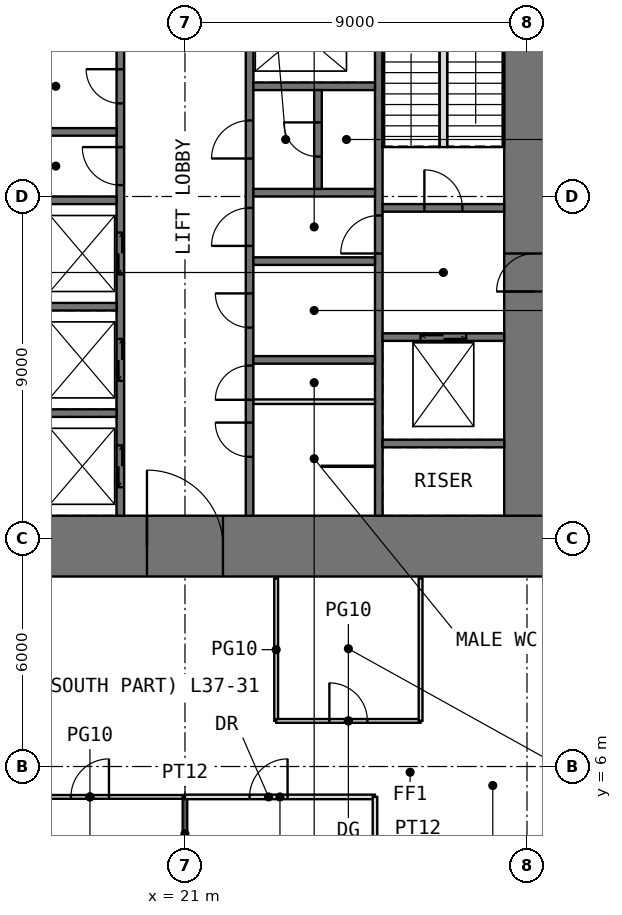
"""IFC4 building model, lengths in metres.
Left out: names, types, materials, properties, quantities, classifications, styles, units other than length and angle.
Written with IfcOpenShell. Run it as: python <this file> out.ifc"""

import sys

from ifc_helpers import new_model, si_unit, direction, frame, frame_2d, origin, place, context, subcontext, project, spatial, rectangle, extrude, element, fill, save


model = new_model("IFC4")
c1 = context("Model", 3, precision=1e-05, world=origin(), true_north=direction((0.0, 1.0)))
c2 = subcontext(c1, "Body", "Model", "MODEL_VIEW")
j1 = project(units=[si_unit("LENGTHUNIT", "METRE"), si_unit("PLANEANGLEUNIT", "RADIAN")], contexts=[c1])
p1 = place(None, origin())
s1 = spatial("IfcSite", under=j1, at=p1, CompositionType="ELEMENT")
p2 = place(p1, origin())
s2 = spatial("IfcBuilding", under=s1, at=p2, CompositionType="ELEMENT")
p3 = place(p2, frame((0.0, 0.0, 156.5)))
s3 = spatial("IfcBuildingStorey", under=s2, at=p3, CompositionType="ELEMENT", Elevation=156.5)
p4 = place(p3, frame((11.0, 11.8, -0.05), z_axis=(0.0, 0.0, 1.0), x_axis=(1.0, 0.0, 0.0)))
e1 = element("IfcWall", 1, at=p4, inside=s3, PredefinedType="SHEAR", context=c2, shape_type="SweptSolid", body=[
    extrude(rectangle(XDim=20.0, YDim=1.6, at=frame_2d((10.0, 0.0))), origin(), (0.0, 0.0, 1.0), 3.8),
])
p5 = place(p4, frame((9.0, 0.0, 0.05)))
e2 = element("IfcOpeningElement", 2, at=p5, cuts=e1, PredefinedType="OPENING", context=c2, shape_type="SweptSolid", body=[
    extrude(rectangle(XDim=2.0, YDim=2.2, at=frame_2d((1.0, 1.1))), frame((0.0, 0.81, 0.0), z_axis=(0.0, -1.0, 0.0), x_axis=(1.0, 0.0, 0.0)), (0.0, 0.0, 1.0), 1.62),
])
p6 = place(p3, frame((30.2, 12.6, -0.05), z_axis=(0.0, 0.0, 1.0), x_axis=(0.0, 1.0, 0.0)))
e3 = element("IfcWall", 3, at=p6, inside=s3, PredefinedType="SHEAR", context=c2, shape_type="SweptSolid", body=[
    extrude(rectangle(XDim=16.8, YDim=1.6, at=frame_2d((8.4, 0.0))), origin(), (0.0, 0.0, 1.0), 3.8),
])
p7 = place(p6, frame((5.9, 0.0, 0.05)))
e4 = element("IfcOpeningElement", 4, at=p7, cuts=e3, PredefinedType="OPENING", context=c2, shape_type="SweptSolid", body=[
    extrude(rectangle(XDim=1.0, YDim=2.2, at=frame_2d((0.5, 1.1))), frame((0.0, 0.81, 0.0), z_axis=(0.0, -1.0, 0.0), x_axis=(1.0, 0.0, 0.0)), (0.0, 0.0, 1.0), 1.62),
])
p8 = place(p3, frame((19.3, 12.6, -0.05), z_axis=(0.0, 0.0, 1.0), x_axis=(0.0, 1.0, 0.0)))
e5 = element("IfcWall", 5, at=p8, inside=s3, PredefinedType="SHEAR", context=c2, shape_type="SweptSolid", body=[
    extrude(rectangle(XDim=16.8, YDim=0.2, at=frame_2d((8.4, 0.0))), origin(), (0.0, 0.0, 1.0), 3.8),
])
p9 = place(p8, frame((8.7, 0.0, 0.05)))
e6 = element("IfcOpeningElement", 6, at=p9, cuts=e5, PredefinedType="OPENING", context=c2, shape_type="SweptSolid", body=[
    extrude(rectangle(XDim=1.0, YDim=2.2, at=frame_2d((0.5, 1.1))), frame((0.0, 0.11, 0.0), z_axis=(0.0, -1.0, 0.0), x_axis=(1.0, 0.0, 0.0)), (0.0, 0.0, 1.0), 0.22),
])
p10 = place(p8, frame((10.85, 0.0, 0.05)))
e7 = element("IfcOpeningElement", 7, at=p10, cuts=e5, PredefinedType="OPENING", context=c2, shape_type="SweptSolid", body=[
    extrude(rectangle(XDim=0.9, YDim=2.2, at=frame_2d((0.45, 1.1))), frame((0.0, 0.11, 0.0), z_axis=(0.0, -1.0, 0.0), x_axis=(1.0, 0.0, 0.0)), (0.0, 0.0, 1.0), 0.22),
])
p11 = place(p8, frame((13.3, 0.0, 0.05)))
e8 = element("IfcOpeningElement", 8, at=p11, cuts=e5, PredefinedType="OPENING", context=c2, shape_type="SweptSolid", body=[
    extrude(rectangle(XDim=1.0, YDim=2.2, at=frame_2d((0.5, 1.1))), frame((0.0, 0.11, 0.0), z_axis=(0.0, -1.0, 0.0), x_axis=(1.0, 0.0, 0.0)), (0.0, 0.0, 1.0), 0.22),
])
p12 = place(p8, frame((15.55, 0.0, 0.05)))
e9 = element("IfcOpeningElement", 9, at=p12, cuts=e5, PredefinedType="OPENING", context=c2, shape_type="SweptSolid", body=[
    extrude(rectangle(XDim=0.9, YDim=2.2, at=frame_2d((0.45, 1.1))), frame((0.0, 0.11, 0.0), z_axis=(0.0, -1.0, 0.0), x_axis=(1.0, 0.0, 0.0)), (0.0, 0.0, 1.0), 0.22),
])
p13 = place(p8, frame((0.75, 0.0, 0.05)))
e10 = element("IfcOpeningElement", 10, at=p13, cuts=e5, PredefinedType="OPENING", context=c2, shape_type="SweptSolid", body=[
    extrude(rectangle(XDim=1.1, YDim=2.2, at=frame_2d((0.55, 1.1))), frame((0.0, 0.11, 0.0), z_axis=(0.0, -1.0, 0.0), x_axis=(1.0, 0.0, 0.0)), (0.0, 0.0, 1.0), 0.22),
])
p14 = place(p8, frame((3.55, 0.0, 0.05)))
e11 = element("IfcOpeningElement", 11, at=p14, cuts=e5, PredefinedType="OPENING", context=c2, shape_type="SweptSolid", body=[
    extrude(rectangle(XDim=1.1, YDim=2.2, at=frame_2d((0.55, 1.1))), frame((0.0, 0.11, 0.0), z_axis=(0.0, -1.0, 0.0), x_axis=(1.0, 0.0, 0.0)), (0.0, 0.0, 1.0), 0.22),
])
p15 = place(p8, frame((6.35, 0.0, 0.05)))
e12 = element("IfcOpeningElement", 12, at=p15, cuts=e5, PredefinedType="OPENING", context=c2, shape_type="SweptSolid", body=[
    extrude(rectangle(XDim=1.1, YDim=2.2, at=frame_2d((0.55, 1.1))), frame((0.0, 0.11, 0.0), z_axis=(0.0, -1.0, 0.0), x_axis=(1.0, 0.0, 0.0)), (0.0, 0.0, 1.0), 0.22),
])
p16 = place(p3, frame((22.7, 12.6, -0.05), z_axis=(0.0, 0.0, 1.0), x_axis=(0.0, 1.0, 0.0)))
e13 = element("IfcWall", 13, at=p16, inside=s3, PredefinedType="SHEAR", context=c2, shape_type="SweptSolid", body=[
    extrude(rectangle(XDim=16.8, YDim=0.2, at=frame_2d((8.4, 0.0))), origin(), (0.0, 0.0, 1.0), 3.8),
])
p17 = place(p16, frame((3.05, 0.0, 0.05)))
e14 = element("IfcOpeningElement", 14, at=p17, cuts=e13, PredefinedType="OPENING", context=c2, shape_type="SweptSolid", body=[
    extrude(rectangle(XDim=0.9, YDim=2.2, at=frame_2d((0.45, 1.1))), frame((0.0, 0.11, 0.0), z_axis=(0.0, -1.0, 0.0), x_axis=(1.0, 0.0, 0.0)), (0.0, 0.0, 1.0), 0.22),
])
p18 = place(p16, frame((7.1, 0.0, 0.05)))
e15 = element("IfcOpeningElement", 15, at=p18, cuts=e13, PredefinedType="OPENING", context=c2, shape_type="SweptSolid", body=[
    extrude(rectangle(XDim=1.0, YDim=2.2, at=frame_2d((0.5, 1.1))), frame((0.0, 0.11, 0.0), z_axis=(0.0, -1.0, 0.0), x_axis=(1.0, 0.0, 0.0)), (0.0, 0.0, 1.0), 0.22),
])
p19 = place(p16, frame((1.55, 0.0, 0.05)))
e16 = element("IfcOpeningElement", 16, at=p19, cuts=e13, PredefinedType="OPENING", context=c2, shape_type="SweptSolid", body=[
    extrude(rectangle(XDim=0.9, YDim=2.2, at=frame_2d((0.45, 1.1))), frame((0.0, 0.11, 0.0), z_axis=(0.0, -1.0, 0.0), x_axis=(1.0, 0.0, 0.0)), (0.0, 0.0, 1.0), 0.22),
])
p20 = place(p16, frame((4.95, 0.0, 0.05)))
e17 = element("IfcOpeningElement", 17, at=p20, cuts=e13, PredefinedType="OPENING", context=c2, shape_type="SweptSolid", body=[
    extrude(rectangle(XDim=0.9, YDim=2.2, at=frame_2d((0.45, 1.1))), frame((0.0, 0.11, 0.0), z_axis=(0.0, -1.0, 0.0), x_axis=(1.0, 0.0, 0.0)), (0.0, 0.0, 1.0), 0.22),
])
p21 = place(p16, frame((9.4, 0.0, 0.05)))
e18 = element("IfcOpeningElement", 18, at=p21, cuts=e13, PredefinedType="OPENING", context=c2, shape_type="SweptSolid", body=[
    extrude(rectangle(XDim=1.0, YDim=2.2, at=frame_2d((0.5, 1.1))), frame((0.0, 0.11, 0.0), z_axis=(0.0, -1.0, 0.0), x_axis=(1.0, 0.0, 0.0)), (0.0, 0.0, 1.0), 0.22),
])
p22 = place(p3, frame((26.1, 12.6, -0.05), z_axis=(0.0, 0.0, 1.0), x_axis=(0.0, 1.0, 0.0)))
e19 = element("IfcWall", 19, at=p22, inside=s3, PredefinedType="SHEAR", context=c2, shape_type="SweptSolid", body=[
    extrude(rectangle(XDim=16.8, YDim=0.2, at=frame_2d((8.4, 0.0))), origin(), (0.0, 0.0, 1.0), 3.8),
])
p23 = place(p22, frame((6.9, 0.0, 0.05)))
e20 = element("IfcOpeningElement", 20, at=p23, cuts=e19, PredefinedType="OPENING", context=c2, shape_type="SweptSolid", body=[
    extrude(rectangle(XDim=1.0, YDim=2.2, at=frame_2d((0.5, 1.1))), frame((0.0, 0.11, 0.0), z_axis=(0.0, -1.0, 0.0), x_axis=(1.0, 0.0, 0.0)), (0.0, 0.0, 1.0), 0.22),
])
for number, where, z_axis, x_axis in (
    (21, (16.0, 15.3, -0.05), (0.0, 0.0, 1.0), (1.0, 0.0, 0.0)),
    (22, (16.0, 18.1, -0.05), (0.0, 0.0, 1.0), (1.0, 0.0, 0.0)),
    (23, (16.0, 20.9, -0.05), (0.0, 0.0, 1.0), (1.0, 0.0, 0.0)),
    (24, (16.0, 22.7, -0.05), (0.0, 0.0, 1.0), (1.0, 0.0, 0.0)),
    (25, (22.8, 16.7, -0.05), (0.0, 0.0, 1.0), (1.0, 0.0, 0.0)),
    (26, (22.8, 19.3, -0.05), (0.0, 0.0, 1.0), (1.0, 0.0, 0.0)),
    (27, (22.8, 21.1, -0.05), (0.0, 0.0, 1.0), (1.0, 0.0, 0.0)),
    (28, (22.8, 23.9, -0.05), (0.0, 0.0, 1.0), (1.0, 0.0, 0.0)),
    (29, (26.2, 14.5, -0.05), (0.0, 0.0, 1.0), (1.0, 0.0, 0.0)),
):
    element("IfcWall", number, at=place(p3, frame(where, z_axis=z_axis, x_axis=x_axis)), inside=s3, PredefinedType="SHEAR", context=c2, shape_type="SweptSolid", body=[
        extrude(rectangle(XDim=3.2, YDim=0.2, at=frame_2d((1.6, 0.0))), origin(), (0.0, 0.0, 1.0), 3.8),
    ])
p24 = place(p3, frame((26.2, 17.3, -0.05), z_axis=(0.0, 0.0, 1.0), x_axis=(1.0, 0.0, 0.0)))
e30 = element("IfcWall", 30, at=p24, inside=s3, PredefinedType="SHEAR", context=c2, shape_type="SweptSolid", body=[
    extrude(rectangle(XDim=3.2, YDim=0.2, at=frame_2d((1.6, 0.0))), origin(), (0.0, 0.0, 1.0), 3.8),
])
p25 = place(p24, frame((1.0, 0.0, 0.05)))
e31 = element("IfcOpeningElement", 31, at=p25, cuts=e30, PredefinedType="OPENING", context=c2, shape_type="SweptSolid", body=[
    extrude(rectangle(XDim=1.2, YDim=2.2, at=frame_2d((0.6, 1.1))), frame((0.0, 0.11, 0.0), z_axis=(0.0, -1.0, 0.0), x_axis=(1.0, 0.0, 0.0)), (0.0, 0.0, 1.0), 0.22),
])
p26 = place(p3, frame((26.2, 20.7, -0.05), z_axis=(0.0, 0.0, 1.0), x_axis=(1.0, 0.0, 0.0)))
e32 = element("IfcWall", 32, at=p26, inside=s3, PredefinedType="SHEAR", context=c2, shape_type="SweptSolid", body=[
    extrude(rectangle(XDim=3.2, YDim=0.2, at=frame_2d((1.6, 0.0))), origin(), (0.0, 0.0, 1.0), 3.8),
])
p27 = place(p26, frame((1.1, 0.0, 0.05)))
e33 = element("IfcOpeningElement", 33, at=p27, cuts=e32, PredefinedType="OPENING", context=c2, shape_type="SweptSolid", body=[
    extrude(rectangle(XDim=1.0, YDim=2.2, at=frame_2d((0.5, 1.1))), frame((0.0, 0.11, 0.0), z_axis=(0.0, -1.0, 0.0), x_axis=(1.0, 0.0, 0.0)), (0.0, 0.0, 1.0), 0.22),
])
p28 = place(p3, frame((22.8, 15.6, 0.0), z_axis=(0.0, 0.0, 1.0), x_axis=(1.0, 0.0, 0.0)))
e34 = element("IfcWall", 34, at=p28, inside=s3, PredefinedType="PARTITIONING", context=c2, shape_type="SweptSolid", body=[
    extrude(rectangle(XDim=3.2, YDim=0.12, at=frame_2d((1.6, 0.0))), origin(), (0.0, 0.0, 1.0), 3.55),
])
p29 = place(p3, frame((24.6, 13.9, 0.0), z_axis=(0.0, 0.0, 1.0), x_axis=(1.0, 0.0, 0.0)))
e35 = element("IfcWall", 35, at=p29, inside=s3, PredefinedType="PARTITIONING", context=c2, shape_type="SweptSolid", body=[
    extrude(rectangle(XDim=1.4, YDim=0.03, at=frame_2d((0.7, 0.0))), origin(), (0.0, 0.0, 1.0), 3.55),
])
p30 = place(p3, frame((24.5, 21.2, -0.05), z_axis=(0.0, 0.0, 1.0), x_axis=(0.0, 1.0, 0.0)))
e36 = element("IfcWall", 36, at=p30, inside=s3, PredefinedType="SHEAR", context=c2, shape_type="SweptSolid", body=[
    extrude(rectangle(XDim=2.6, YDim=0.2, at=frame_2d((1.3, 0.0))), origin(), (0.0, 0.0, 1.0), 3.8),
])
p31 = place(p30, frame((0.85, 0.0, 0.05)))
e37 = element("IfcOpeningElement", 37, at=p31, cuts=e36, PredefinedType="OPENING", context=c2, shape_type="SweptSolid", body=[
    extrude(rectangle(XDim=0.9, YDim=2.2, at=frame_2d((0.45, 1.1))), frame((0.0, 0.11, 0.0), z_axis=(0.0, -1.0, 0.0), x_axis=(1.0, 0.0, 0.0)), (0.0, 0.0, 1.0), 0.22),
])
p32 = place(p3, frame((16.0, 5.2, 0.0), z_axis=(0.0, 0.0, 1.0), x_axis=(1.0, 0.0, 0.0)))
e38 = element("IfcWall", 38, at=p32, inside=s3, PredefinedType="PARTITIONING", context=c2, shape_type="SweptSolid", body=[
    extrude(rectangle(XDim=5.0, YDim=0.1, at=frame_2d((2.5, 0.0))), origin(), (0.0, 0.0, 1.0), 3.55),
])
p33 = place(p32, frame((2.0, 0.0, 0.0)))
e39 = element("IfcOpeningElement", 39, at=p33, cuts=e38, PredefinedType="OPENING", context=c2, shape_type="SweptSolid", body=[
    extrude(rectangle(XDim=1.0, YDim=2.4, at=frame_2d((0.5, 1.2))), frame((0.0, 0.06, 0.0), z_axis=(0.0, -1.0, 0.0), x_axis=(1.0, 0.0, 0.0)), (0.0, 0.0, 1.0), 0.12),
])
p34 = place(p3, frame((21.0, 3.26, 0.0), z_axis=(0.0, 0.0, 1.0), x_axis=(0.0, 1.0, 0.0)))
e40 = element("IfcWall", 40, at=p34, inside=s3, PredefinedType="PARTITIONING", context=c2, shape_type="SweptSolid", body=[
    extrude(rectangle(XDim=1.94, YDim=0.12, at=frame_2d((0.97, 0.0))), origin(), (0.0, 0.0, 1.0), 3.55),
])
p35 = place(p3, frame((21.0, 5.2, 0.0), z_axis=(0.0, 0.0, 1.0), x_axis=(1.0, 0.0, 0.0)))
e41 = element("IfcWall", 41, at=p35, inside=s3, PredefinedType="PARTITIONING", context=c2, shape_type="SweptSolid", body=[
    extrude(rectangle(XDim=5.0, YDim=0.12, at=frame_2d((2.5, 0.0))), origin(), (0.0, 0.0, 1.0), 3.55),
])
p36 = place(p35, frame((1.7, 0.0, 0.0)))
e42 = element("IfcOpeningElement", 42, at=p36, cuts=e41, PredefinedType="OPENING", context=c2, shape_type="SweptSolid", body=[
    extrude(rectangle(XDim=1.0, YDim=2.2, at=frame_2d((0.5, 1.1))), frame((0.0, 0.07, 0.0), z_axis=(0.0, -1.0, 0.0), x_axis=(1.0, 0.0, 0.0)), (0.0, 0.0, 1.0), 0.14),
])
p37 = place(p3, frame((23.4, 7.2, 0.0), z_axis=(0.0, 0.0, 1.0), x_axis=(0.0, 1.0, 0.0)))
e43 = element("IfcWall", 43, at=p37, inside=s3, PredefinedType="PARTITIONING", context=c2, shape_type="SweptSolid", body=[
    extrude(rectangle(XDim=3.75, YDim=0.1, at=frame_2d((1.875, 0.0))), origin(), (0.0, 0.0, 1.0), 3.55),
])
p38 = place(p3, frame((23.4, 7.2, 0.0), z_axis=(0.0, 0.0, 1.0), x_axis=(1.0, 0.0, 0.0)))
e44 = element("IfcWall", 44, at=p38, inside=s3, PredefinedType="PARTITIONING", context=c2, shape_type="SweptSolid", body=[
    extrude(rectangle(XDim=3.8, YDim=0.1, at=frame_2d((1.9, 0.0))), origin(), (0.0, 0.0, 1.0), 3.55),
])
p39 = place(p38, frame((1.4, 0.0, 0.0)))
e45 = element("IfcOpeningElement", 45, at=p39, cuts=e44, PredefinedType="OPENING", context=c2, shape_type="SweptSolid", body=[
    extrude(rectangle(XDim=1.0, YDim=2.4, at=frame_2d((0.5, 1.2))), frame((0.0, 0.06, 0.0), z_axis=(0.0, -1.0, 0.0), x_axis=(1.0, 0.0, 0.0)), (0.0, 0.0, 1.0), 0.12),
])
p40 = place(p3, frame((26.0, 1.26, 0.0), z_axis=(0.0, 0.0, 1.0), x_axis=(0.0, 1.0, 0.0)))
e46 = element("IfcWall", 46, at=p40, inside=s3, PredefinedType="PARTITIONING", context=c2, shape_type="SweptSolid", body=[
    extrude(rectangle(XDim=3.94, YDim=0.12, at=frame_2d((1.97, 0.0))), origin(), (0.0, 0.0, 1.0), 2.736),
])
p41 = place(p3, frame((27.2, 7.2, 0.0), z_axis=(0.0, 0.0, 1.0), x_axis=(0.0, 1.0, 0.0)))
e47 = element("IfcWall", 47, at=p41, inside=s3, PredefinedType="PARTITIONING", context=c2, shape_type="SweptSolid", body=[
    extrude(rectangle(XDim=3.75, YDim=0.1, at=frame_2d((1.875, 0.0))), origin(), (0.0, 0.0, 1.0), 3.55),
])
p42 = place(p3, frame((27.8, 22.3, 0.0), z_axis=(0.0, 0.0, 1.0), x_axis=(0.0, 1.0, 0.0)))
e48 = element("IfcWall", 48, at=p42, inside=s3, PredefinedType="PARTITIONING", context=c2, shape_type="SweptSolid", body=[
    extrude(rectangle(XDim=3.08, YDim=0.2, at=frame_2d((1.54, 0.0))), origin(), (0.0, 0.0, 1.0), 4.0),
])
p43 = place(p5, origin())
e49 = element("IfcDoor", 49, at=p43, inside=s3, OperationType="DOUBLE_DOOR_SINGLE_SWING", PredefinedType="DOOR", context=c2, shape_type="SweptSolid", body=[
    extrude(rectangle(XDim=2.0, YDim=2.2, at=frame_2d((1.0, 1.1))), frame((0.0, 0.025, 0.0), z_axis=(0.0, -1.0, 0.0), x_axis=(1.0, 0.0, 0.0)), (0.0, 0.0, 1.0), 0.05),
])
fill(e2, e49)
p44 = place(p17, origin())
e50 = element("IfcDoor", 50, at=p44, inside=s3, OperationType="SINGLE_SWING_LEFT", PredefinedType="DOOR", context=c2, shape_type="SweptSolid", body=[
    extrude(rectangle(XDim=0.9, YDim=2.2, at=frame_2d((0.45, 1.1))), frame((0.0, 0.025, 0.0), z_axis=(0.0, -1.0, 0.0), x_axis=(1.0, 0.0, 0.0)), (0.0, 0.0, 1.0), 0.05),
])
fill(e14, e50)
p45 = place(p7, origin())
e51 = element("IfcDoor", 51, at=p45, inside=s3, OperationType="SINGLE_SWING_LEFT", PredefinedType="DOOR", context=c2, shape_type="SweptSolid", body=[
    extrude(rectangle(XDim=1.0, YDim=2.2, at=frame_2d((0.5, 1.1))), frame((0.0, 0.025, 0.0), z_axis=(0.0, -1.0, 0.0), x_axis=(1.0, 0.0, 0.0)), (0.0, 0.0, 1.0), 0.05),
])
fill(e4, e51)
p46 = place(p27, origin())
e52 = element("IfcDoor", 52, at=p46, inside=s3, OperationType="SINGLE_SWING_LEFT", PredefinedType="DOOR", context=c2, shape_type="SweptSolid", body=[
    extrude(rectangle(XDim=1.0, YDim=2.2, at=frame_2d((0.5, 1.1))), frame((0.0, 0.025, 0.0), z_axis=(0.0, -1.0, 0.0), x_axis=(1.0, 0.0, 0.0)), (0.0, 0.0, 1.0), 0.05),
])
fill(e33, e52)
p47 = place(p23, origin())
e53 = element("IfcDoor", 53, at=p47, inside=s3, OperationType="SINGLE_SWING_LEFT", PredefinedType="DOOR", context=c2, shape_type="SweptSolid", body=[
    extrude(rectangle(XDim=1.0, YDim=2.2, at=frame_2d((0.5, 1.1))), frame((0.0, 0.025, 0.0), z_axis=(0.0, -1.0, 0.0), x_axis=(1.0, 0.0, 0.0)), (0.0, 0.0, 1.0), 0.05),
])
fill(e20, e53)
p48 = place(p9, origin())
e54 = element("IfcDoor", 54, at=p48, inside=s3, OperationType="SINGLE_SWING_RIGHT", PredefinedType="DOOR", context=c2, shape_type="SweptSolid", body=[
    extrude(rectangle(XDim=1.0, YDim=2.2, at=frame_2d((0.5, 1.1))), frame((0.0, 0.025, 0.0), z_axis=(0.0, -1.0, 0.0), x_axis=(1.0, 0.0, 0.0)), (0.0, 0.0, 1.0), 0.05),
])
fill(e6, e54)
p49 = place(p18, origin())
e55 = element("IfcDoor", 55, at=p49, inside=s3, OperationType="SINGLE_SWING_LEFT", PredefinedType="DOOR", context=c2, shape_type="SweptSolid", body=[
    extrude(rectangle(XDim=1.0, YDim=2.2, at=frame_2d((0.5, 1.1))), frame((0.0, 0.025, 0.0), z_axis=(0.0, -1.0, 0.0), x_axis=(1.0, 0.0, 0.0)), (0.0, 0.0, 1.0), 0.05),
])
fill(e15, e55)
p50 = place(p10, origin())
e56 = element("IfcDoor", 56, at=p50, inside=s3, OperationType="SINGLE_SWING_RIGHT", PredefinedType="DOOR", context=c2, shape_type="SweptSolid", body=[
    extrude(rectangle(XDim=0.9, YDim=2.2, at=frame_2d((0.45, 1.1))), frame((0.0, 0.025, 0.0), z_axis=(0.0, -1.0, 0.0), x_axis=(1.0, 0.0, 0.0)), (0.0, 0.0, 1.0), 0.05),
])
fill(e7, e56)
p51 = place(p19, origin())
e57 = element("IfcDoor", 57, at=p51, inside=s3, OperationType="SINGLE_SWING_RIGHT", PredefinedType="DOOR", context=c2, shape_type="SweptSolid", body=[
    extrude(rectangle(XDim=0.9, YDim=2.2, at=frame_2d((0.45, 1.1))), frame((0.0, 0.025, 0.0), z_axis=(0.0, -1.0, 0.0), x_axis=(1.0, 0.0, 0.0)), (0.0, 0.0, 1.0), 0.05),
])
fill(e16, e57)
p52 = place(p20, origin())
e58 = element("IfcDoor", 58, at=p52, inside=s3, OperationType="SINGLE_SWING_RIGHT", PredefinedType="DOOR", context=c2, shape_type="SweptSolid", body=[
    extrude(rectangle(XDim=0.9, YDim=2.2, at=frame_2d((0.45, 1.1))), frame((0.0, 0.025, 0.0), z_axis=(0.0, -1.0, 0.0), x_axis=(1.0, 0.0, 0.0)), (0.0, 0.0, 1.0), 0.05),
])
fill(e17, e58)
p53 = place(p21, origin())
e59 = element("IfcDoor", 59, at=p53, inside=s3, OperationType="SINGLE_SWING_LEFT", PredefinedType="DOOR", context=c2, shape_type="SweptSolid", body=[
    extrude(rectangle(XDim=1.0, YDim=2.2, at=frame_2d((0.5, 1.1))), frame((0.0, 0.025, 0.0), z_axis=(0.0, -1.0, 0.0), x_axis=(1.0, 0.0, 0.0)), (0.0, 0.0, 1.0), 0.05),
])
fill(e18, e59)
p54 = place(p31, origin())
e60 = element("IfcDoor", 60, at=p54, inside=s3, OperationType="SINGLE_SWING_RIGHT", PredefinedType="DOOR", context=c2, shape_type="SweptSolid", body=[
    extrude(rectangle(XDim=0.9, YDim=2.2, at=frame_2d((0.45, 1.1))), frame((0.0, 0.025, 0.0), z_axis=(0.0, -1.0, 0.0), x_axis=(1.0, 0.0, 0.0)), (0.0, 0.0, 1.0), 0.05),
])
fill(e37, e60)
p55 = place(p39, origin())
e61 = element("IfcDoor", 61, at=p55, inside=s3, OperationType="SINGLE_SWING_LEFT", PredefinedType="DOOR", context=c2, shape_type="SweptSolid", body=[
    extrude(rectangle(XDim=1.0, YDim=2.4, at=frame_2d((0.5, 1.2))), frame((0.0, 0.025, 0.0), z_axis=(0.0, -1.0, 0.0), x_axis=(1.0, 0.0, 0.0)), (0.0, 0.0, 1.0), 0.05),
])
fill(e45, e61)
p56 = place(p33, origin())
e62 = element("IfcDoor", 62, at=p56, inside=s3, OperationType="SINGLE_SWING_RIGHT", PredefinedType="DOOR", context=c2, shape_type="SweptSolid", body=[
    extrude(rectangle(XDim=1.0, YDim=2.4, at=frame_2d((0.5, 1.2))), frame((0.0, 0.025, 0.0), z_axis=(0.0, -1.0, 0.0), x_axis=(1.0, 0.0, 0.0)), (0.0, 0.0, 1.0), 0.05),
])
fill(e39, e62)
p57 = place(p36, origin())
e63 = element("IfcDoor", 63, at=p57, inside=s3, OperationType="SINGLE_SWING_RIGHT", PredefinedType="DOOR", context=c2, shape_type="SweptSolid", body=[
    extrude(rectangle(XDim=1.0, YDim=2.2, at=frame_2d((0.5, 1.1))), frame((0.0, 0.025, 0.0), z_axis=(0.0, -1.0, 0.0), x_axis=(1.0, 0.0, 0.0)), (0.0, 0.0, 1.0), 0.05),
])
fill(e42, e63)
p58 = place(p13, origin())
e64 = element("IfcDoor", 64, at=p58, inside=s3, OperationType="DOUBLE_DOOR_SLIDING", PredefinedType="DOOR", context=c2, shape_type="SweptSolid", body=[
    extrude(rectangle(XDim=1.1, YDim=2.2, at=frame_2d((0.55, 1.1))), frame((0.0, 0.025, 0.0), z_axis=(0.0, -1.0, 0.0), x_axis=(1.0, 0.0, 0.0)), (0.0, 0.0, 1.0), 0.05),
])
fill(e10, e64)
p59 = place(p14, origin())
e65 = element("IfcDoor", 65, at=p59, inside=s3, OperationType="DOUBLE_DOOR_SLIDING", PredefinedType="DOOR", context=c2, shape_type="SweptSolid", body=[
    extrude(rectangle(XDim=1.1, YDim=2.2, at=frame_2d((0.55, 1.1))), frame((0.0, 0.025, 0.0), z_axis=(0.0, -1.0, 0.0), x_axis=(1.0, 0.0, 0.0)), (0.0, 0.0, 1.0), 0.05),
])
fill(e11, e65)
p60 = place(p15, origin())
e66 = element("IfcDoor", 66, at=p60, inside=s3, OperationType="DOUBLE_DOOR_SLIDING", PredefinedType="DOOR", context=c2, shape_type="SweptSolid", body=[
    extrude(rectangle(XDim=1.1, YDim=2.2, at=frame_2d((0.55, 1.1))), frame((0.0, 0.025, 0.0), z_axis=(0.0, -1.0, 0.0), x_axis=(1.0, 0.0, 0.0)), (0.0, 0.0, 1.0), 0.05),
])
fill(e12, e66)
p61 = place(p25, origin())
e67 = element("IfcDoor", 67, at=p61, inside=s3, OperationType="DOUBLE_DOOR_SLIDING", PredefinedType="DOOR", context=c2, shape_type="SweptSolid", body=[
    extrude(rectangle(XDim=1.2, YDim=2.2, at=frame_2d((0.6, 1.1))), frame((0.0, 0.025, 0.0), z_axis=(0.0, -1.0, 0.0), x_axis=(1.0, 0.0, 0.0)), (0.0, 0.0, 1.0), 0.05),
])
fill(e31, e67)
save(model, sys.argv[1])
